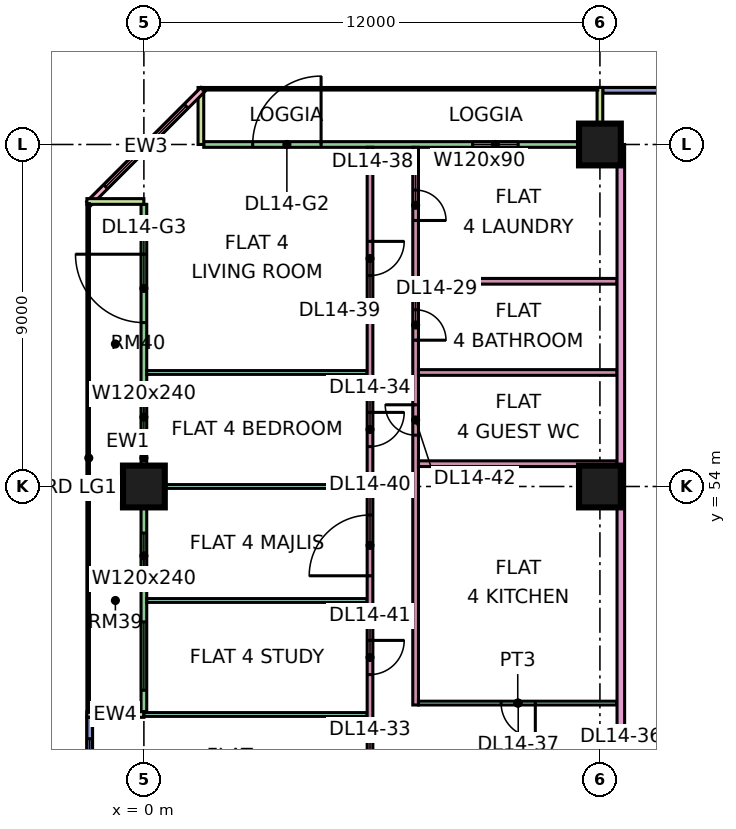
"""IFC4 building model, lengths in metres.
Left out: names, types, materials, properties, quantities, classifications, styles, units other than length and angle.
Written with IfcOpenShell. Run it as: python <this file> out.ifc"""

import sys

from ifc_helpers import new_model, si_unit, direction, frame, frame_2d, origin, origin_2d, place, context, subcontext, project, spatial, rectangle, extrude, element, fill, save


model = new_model("IFC4")
c1 = context("Model", 3, precision=1e-05, world=origin(), true_north=direction((0.0, 1.0)))
c2 = subcontext(c1, "Body", "Model", "MODEL_VIEW")
j1 = project(units=[si_unit("LENGTHUNIT", "METRE"), si_unit("PLANEANGLEUNIT", "RADIAN")], contexts=[c1])
p1 = place(None, origin())
s1 = spatial("IfcSite", under=j1, at=p1, CompositionType="ELEMENT")
p2 = place(p1, origin())
s2 = spatial("IfcBuilding", under=s1, at=p2, CompositionType="ELEMENT")
p3 = place(p2, frame((0.0, 0.0, 67.65)))
s3 = spatial("IfcBuildingStorey", under=s2, at=p3, CompositionType="ELEMENT", Elevation=67.65)
for number, where, z_axis, x_axis in (
    (1, (0.0, 54.0, 0.0), (0.0, 0.0, 1.0), (1.0, 0.0, 0.0)),
    (2, (12.0, 54.0, 0.0), (0.0, 0.0, 1.0), (1.0, 0.0, 0.0)),
    (3, (12.0, 63.0, 0.0), (0.0, 0.0, 1.0), (1.0, 0.0, 0.0)),
):
    element("IfcColumn", number, at=place(p3, frame(where, z_axis=z_axis, x_axis=x_axis)), inside=s3, PredefinedType="COLUMN", context=c2, shape_type="SweptSolid", body=[
        extrude(rectangle(XDim=1.1, YDim=1.1, at=origin_2d()), origin(), (0.0, 0.0, 1.0), 3.75),
    ])
p4 = place(p3, frame((22.5, 64.425, 0.0), z_axis=(0.0, 0.0, 1.0), x_axis=(-1.0, 0.0, 0.0)))
e4 = element("IfcWall", 4, at=p4, inside=s3, PredefinedType="SOLIDWALL", context=c2, shape_type="SweptSolid", body=[
    extrude(rectangle(XDim=10.425, YDim=0.15, at=frame_2d((5.212, 0.0))), origin(), (0.0, 0.0, 1.0), 3.35),
])
p5 = place(p4, frame((1.95, 0.0, 0.45)))
e5 = element("IfcOpeningElement", 5, at=p5, cuts=e4, PredefinedType="OPENING", context=c2, shape_type="SweptSolid", body=[
    extrude(rectangle(XDim=3.0, YDim=2.4, at=frame_2d((1.5, 1.2))), frame((0.0, 0.085, 0.0), z_axis=(0.0, -1.0, 0.0), x_axis=(1.0, 0.0, 0.0)), (0.0, 0.0, 1.0), 0.17),
])
p6 = place(p3, frame((11.925, 63.0, 0.0), z_axis=(0.0, 0.0, 1.0), x_axis=(-1.0, 0.0, 0.0)))
e6 = element("IfcWall", 6, at=p6, inside=s3, PredefinedType="SOLIDWALL", context=c2, shape_type="SweptSolid", body=[
    extrude(rectangle(XDim=10.35, YDim=0.15, at=frame_2d((5.175, 0.0))), origin(), (0.0, 0.0, 1.0), 3.35),
])
p7 = place(p6, frame((2.075, 0.0, 1.7)))
e7 = element("IfcOpeningElement", 7, at=p7, cuts=e6, PredefinedType="OPENING", context=c2, shape_type="SweptSolid", body=[
    extrude(rectangle(XDim=1.2, YDim=0.9, at=frame_2d((0.6, 0.45))), frame((0.0, 0.085, 0.0), z_axis=(0.0, -1.0, 0.0), x_axis=(1.0, 0.0, 0.0)), (0.0, 0.0, 1.0), 0.17),
])
p8 = place(p6, frame((7.262, 0.0, 0.0)))
e8 = element("IfcOpeningElement", 8, at=p8, cuts=e6, PredefinedType="OPENING", context=c2, shape_type="SweptSolid", body=[
    extrude(rectangle(XDim=1.8, YDim=2.4, at=frame_2d((0.9, 1.2))), frame((0.0, 0.085, 0.0), z_axis=(0.0, -1.0, 0.0), x_axis=(1.0, 0.0, 0.0)), (0.0, 0.0, 1.0), 0.17),
])
for number, where, z_axis, x_axis in (
    (9, (12.0, 64.5, 0.0), (0.0, 0.0, 1.0), (0.0, -1.0, 0.0)),
    (10, (1.5, 64.5, 0.0), (0.0, 0.0, 1.0), (0.0, -1.0, 0.0)),
):
    element("IfcWall", number, at=place(p3, frame(where, z_axis=z_axis, x_axis=x_axis)), inside=s3, PredefinedType="SOLIDWALL", context=c2, shape_type="SweptSolid", body=[
        extrude(rectangle(XDim=1.5, YDim=0.15, at=frame_2d((0.75, 0.0))), origin(), (0.0, 0.0, 1.0), 3.35),
    ])
p9 = place(p3, frame((1.553, 64.447, 0.0), z_axis=(0.0, 0.0, 1.0), x_axis=(-0.707106781187, -0.707106781187, 0.0)))
e11 = element("IfcWall", 11, at=p9, inside=s3, PredefinedType="SOLIDWALL", context=c2, shape_type="SweptSolid", body=[
    extrude(rectangle(XDim=4.243, YDim=0.15, at=frame_2d((2.121, 0.0))), origin(), (0.0, 0.0, 1.0), 3.35),
])
p10 = place(p9, frame((0.621, 0.0, 0.45)))
e12 = element("IfcOpeningElement", 12, at=p10, cuts=e11, PredefinedType="OPENING", context=c2, shape_type="SweptSolid", body=[
    extrude(rectangle(XDim=3.0, YDim=2.4, at=frame_2d((1.5, 1.2))), frame((0.0, 0.085, 0.0), z_axis=(0.0, -1.0, 0.0), x_axis=(1.0, 0.0, 0.0)), (0.0, 0.0, 1.0), 0.17),
])
p11 = place(p3, frame((0.0, 61.425, 0.0), z_axis=(0.0, 0.0, 1.0), x_axis=(0.0, -1.0, 0.0)))
e13 = element("IfcWall", 13, at=p11, inside=s3, PredefinedType="SOLIDWALL", context=c2, shape_type="SweptSolid", body=[
    extrude(rectangle(XDim=13.35, YDim=0.15, at=frame_2d((6.675, 0.0))), origin(), (0.0, 0.0, 1.0), 3.35),
])
p12 = place(p11, frame((1.312, 0.0, 0.0)))
e14 = element("IfcOpeningElement", 14, at=p12, cuts=e13, PredefinedType="OPENING", context=c2, shape_type="SweptSolid", body=[
    extrude(rectangle(XDim=1.8, YDim=2.4, at=frame_2d((0.9, 1.2))), frame((0.0, 0.085, 0.0), z_axis=(0.0, -1.0, 0.0), x_axis=(1.0, 0.0, 0.0)), (0.0, 0.0, 1.0), 0.17),
])
p13 = place(p11, frame((5.0, 0.0, 0.45)))
e15 = element("IfcOpeningElement", 15, at=p13, cuts=e13, PredefinedType="OPENING", context=c2, shape_type="SweptSolid", body=[
    extrude(rectangle(XDim=1.2, YDim=2.4, at=frame_2d((0.6, 1.2))), frame((0.0, 0.085, 0.0), z_axis=(0.0, -1.0, 0.0), x_axis=(1.0, 0.0, 0.0)), (0.0, 0.0, 1.0), 0.17),
])
p14 = place(p11, frame((8.65, 0.0, 0.45)))
e16 = element("IfcOpeningElement", 16, at=p14, cuts=e13, PredefinedType="OPENING", context=c2, shape_type="SweptSolid", body=[
    extrude(rectangle(XDim=1.2, YDim=2.4, at=frame_2d((0.6, 1.2))), frame((0.0, 0.085, 0.0), z_axis=(0.0, -1.0, 0.0), x_axis=(1.0, 0.0, 0.0)), (0.0, 0.0, 1.0), 0.17),
])
p15 = place(p11, frame((10.988, 0.0, 0.45)))
e17 = element("IfcOpeningElement", 17, at=p15, cuts=e13, PredefinedType="OPENING", context=c2, shape_type="SweptSolid", body=[
    extrude(rectangle(XDim=1.8, YDim=2.4, at=frame_2d((0.9, 1.2))), frame((0.0, 0.085, 0.0), z_axis=(0.0, -1.0, 0.0), x_axis=(1.0, 0.0, 0.0)), (0.0, 0.0, 1.0), 0.17),
])
for number, where, z_axis, x_axis in (
    (18, (-1.5, 61.5, 0.0), (0.0, 0.0, 1.0), (1.0, 0.0, 0.0)),
    (19, (-1.5, 48.0, 0.0), (0.0, 0.0, 1.0), (1.0, 0.0, 0.0)),
):
    element("IfcWall", number, at=place(p3, frame(where, z_axis=z_axis, x_axis=x_axis)), inside=s3, PredefinedType="SOLIDWALL", context=c2, shape_type="SweptSolid", body=[
        extrude(rectangle(XDim=1.5, YDim=0.15, at=frame_2d((0.75, 0.0))), origin(), (0.0, 0.0, 1.0), 3.35),
    ])
p16 = place(p3, frame((-1.425, 47.925, 0.0), z_axis=(0.0, 0.0, 1.0), x_axis=(0.0, -1.0, 0.0)))
e20 = element("IfcWall", 20, at=p16, inside=s3, PredefinedType="SOLIDWALL", context=c2, shape_type="SweptSolid", body=[
    extrude(rectangle(XDim=11.85, YDim=0.15, at=frame_2d((5.925, 0.0))), origin(), (0.0, 0.0, 1.0), 3.35),
])
p17 = place(p16, frame((0.562, 0.0, 0.45)))
e21 = element("IfcOpeningElement", 21, at=p17, cuts=e20, PredefinedType="OPENING", context=c2, shape_type="SweptSolid", body=[
    extrude(rectangle(XDim=1.8, YDim=2.4, at=frame_2d((0.9, 1.2))), frame((0.0, 0.085, 0.0), z_axis=(0.0, -1.0, 0.0), x_axis=(1.0, 0.0, 0.0)), (0.0, 0.0, 1.0), 0.17),
])
p18 = place(p16, frame((3.525, 0.0, 0.45)))
e22 = element("IfcOpeningElement", 22, at=p18, cuts=e20, PredefinedType="OPENING", context=c2, shape_type="SweptSolid", body=[
    extrude(rectangle(XDim=1.8, YDim=2.4, at=frame_2d((0.9, 1.2))), frame((0.0, 0.085, 0.0), z_axis=(0.0, -1.0, 0.0), x_axis=(1.0, 0.0, 0.0)), (0.0, 0.0, 1.0), 0.17),
])
p19 = place(p16, frame((6.525, 0.0, 0.45)))
e23 = element("IfcOpeningElement", 23, at=p19, cuts=e20, PredefinedType="OPENING", context=c2, shape_type="SweptSolid", body=[
    extrude(rectangle(XDim=1.8, YDim=2.4, at=frame_2d((0.9, 1.2))), frame((0.0, 0.085, 0.0), z_axis=(0.0, -1.0, 0.0), x_axis=(1.0, 0.0, 0.0)), (0.0, 0.0, 1.0), 0.17),
])
p20 = place(p16, frame((9.488, 0.0, 0.45)))
e24 = element("IfcOpeningElement", 24, at=p20, cuts=e20, PredefinedType="OPENING", context=c2, shape_type="SweptSolid", body=[
    extrude(rectangle(XDim=1.8, YDim=2.4, at=frame_2d((0.9, 1.2))), frame((0.0, 0.085, 0.0), z_axis=(0.0, -1.0, 0.0), x_axis=(1.0, 0.0, 0.0)), (0.0, 0.0, 1.0), 0.17),
])
p21 = place(p3, frame((0.0, 48.0, 0.0), z_axis=(0.0, 0.0, 1.0), x_axis=(1.0, 0.0, 0.0)))
e25 = element("IfcWall", 25, at=p21, inside=s3, PredefinedType="PARTITIONING", context=c2, shape_type="SweptSolid", body=[
    extrude(rectangle(XDim=5.875, YDim=0.1, at=frame_2d((2.938, 0.0))), origin(), (0.0, 0.0, 1.0), 3.35),
])
for number, where, z_axis, x_axis in (
    (26, (0.074, 51.0, 0.0), (0.0, 0.0, 1.0), (1.0, 0.0, 0.0)),
    (27, (0.074, 54.0, 0.0), (0.0, 0.0, 1.0), (1.0, 0.0, 0.0)),
    (28, (0.074, 57.0, 0.0), (0.0, 0.0, 1.0), (1.0, 0.0, 0.0)),
):
    element("IfcWall", number, at=place(p3, frame(where, z_axis=z_axis, x_axis=x_axis)), inside=s3, PredefinedType="PARTITIONING", context=c2, shape_type="SweptSolid", body=[
        extrude(rectangle(XDim=5.801, YDim=0.1, at=frame_2d((2.9, 0.0))), origin(), (0.0, 0.0, 1.0), 3.35),
    ])
p22 = place(p3, frame((5.95, 36.1, 0.0), z_axis=(0.0, 0.0, 1.0), x_axis=(0.0, 1.0, 0.0)))
e29 = element("IfcWall", 29, at=p22, inside=s3, PredefinedType="PARTITIONING", context=c2, shape_type="SweptSolid", body=[
    extrude(rectangle(XDim=26.826, YDim=0.15, at=frame_2d((13.413, 0.0))), origin(), (0.0, 0.0, 1.0), 3.35),
])
p23 = place(p22, frame((0.95, 0.0, 0.0)))
e30 = element("IfcOpeningElement", 30, at=p23, cuts=e29, PredefinedType="OPENING", context=c2, shape_type="SweptSolid", body=[
    extrude(rectangle(XDim=0.9, YDim=2.1, at=frame_2d((0.45, 1.05))), frame((0.0, 0.085, 0.0), z_axis=(0.0, -1.0, 0.0), x_axis=(1.0, 0.0, 0.0)), (0.0, 0.0, 1.0), 0.17),
])
p24 = place(p22, frame((3.95, 0.0, 0.0)))
e31 = element("IfcOpeningElement", 31, at=p24, cuts=e29, PredefinedType="OPENING", context=c2, shape_type="SweptSolid", body=[
    extrude(rectangle(XDim=0.9, YDim=2.1, at=frame_2d((0.45, 1.05))), frame((0.0, 0.085, 0.0), z_axis=(0.0, -1.0, 0.0), x_axis=(1.0, 0.0, 0.0)), (0.0, 0.0, 1.0), 0.17),
])
p25 = place(p22, frame((6.95, 0.0, 0.0)))
e32 = element("IfcOpeningElement", 32, at=p25, cuts=e29, PredefinedType="OPENING", context=c2, shape_type="SweptSolid", body=[
    extrude(rectangle(XDim=0.9, YDim=2.1, at=frame_2d((0.45, 1.05))), frame((0.0, 0.085, 0.0), z_axis=(0.0, -1.0, 0.0), x_axis=(1.0, 0.0, 0.0)), (0.0, 0.0, 1.0), 0.17),
])
p26 = place(p22, frame((9.95, 0.0, 0.0)))
e33 = element("IfcOpeningElement", 33, at=p26, cuts=e29, PredefinedType="OPENING", context=c2, shape_type="SweptSolid", body=[
    extrude(rectangle(XDim=0.9, YDim=2.1, at=frame_2d((0.45, 1.05))), frame((0.0, 0.085, 0.0), z_axis=(0.0, -1.0, 0.0), x_axis=(1.0, 0.0, 0.0)), (0.0, 0.0, 1.0), 0.17),
])
p27 = place(p22, frame((18.95, 0.0, 0.0)))
e34 = element("IfcOpeningElement", 34, at=p27, cuts=e29, PredefinedType="OPENING", context=c2, shape_type="SweptSolid", body=[
    extrude(rectangle(XDim=0.9, YDim=2.1, at=frame_2d((0.45, 1.05))), frame((0.0, 0.085, 0.0), z_axis=(0.0, -1.0, 0.0), x_axis=(1.0, 0.0, 0.0)), (0.0, 0.0, 1.0), 0.17),
])
p28 = place(p22, frame((23.45, 0.0, 0.0)))
e35 = element("IfcOpeningElement", 35, at=p28, cuts=e29, PredefinedType="OPENING", context=c2, shape_type="SweptSolid", body=[
    extrude(rectangle(XDim=0.9, YDim=2.1, at=frame_2d((0.45, 1.05))), frame((0.0, 0.085, 0.0), z_axis=(0.0, -1.0, 0.0), x_axis=(1.0, 0.0, 0.0)), (0.0, 0.0, 1.0), 0.17),
])
p29 = place(p22, frame((15.55, 0.0, 0.0)))
e36 = element("IfcOpeningElement", 36, at=p29, cuts=e29, PredefinedType="OPENING", context=c2, shape_type="SweptSolid", body=[
    extrude(rectangle(XDim=1.6, YDim=2.1, at=frame_2d((0.8, 1.05))), frame((0.0, 0.085, 0.0), z_axis=(0.0, -1.0, 0.0), x_axis=(1.0, 0.0, 0.0)), (0.0, 0.0, 1.0), 0.17),
])
p30 = place(p22, frame((12.95, 0.0, 0.0)))
e37 = element("IfcOpeningElement", 37, at=p30, cuts=e29, PredefinedType="OPENING", context=c2, shape_type="SweptSolid", body=[
    extrude(rectangle(XDim=0.9, YDim=2.1, at=frame_2d((0.45, 1.05))), frame((0.0, 0.085, 0.0), z_axis=(0.0, -1.0, 0.0), x_axis=(1.0, 0.0, 0.0)), (0.0, 0.0, 1.0), 0.17),
])
p31 = place(p3, frame((7.15, 48.25, 0.0), z_axis=(0.0, 0.0, 1.0), x_axis=(0.0, 1.0, 0.0)))
e38 = element("IfcWall", 38, at=p31, inside=s3, PredefinedType="PARTITIONING", context=c2, shape_type="SweptSolid", body=[
    extrude(rectangle(XDim=14.676, YDim=0.15, at=frame_2d((7.338, 0.0))), origin(), (0.0, 0.0, 1.0), 3.35),
])
p32 = place(p31, frame((9.6, 0.0, 0.0)))
e39 = element("IfcOpeningElement", 39, at=p32, cuts=e38, PredefinedType="OPENING", context=c2, shape_type="SweptSolid", body=[
    extrude(rectangle(XDim=0.8, YDim=2.1, at=frame_2d((0.4, 1.05))), frame((0.0, 0.085, 0.0), z_axis=(0.0, -1.0, 0.0), x_axis=(1.0, 0.0, 0.0)), (0.0, 0.0, 1.0), 0.17),
])
p33 = place(p31, frame((12.75, 0.0, 0.0)))
e40 = element("IfcOpeningElement", 40, at=p33, cuts=e38, PredefinedType="OPENING", context=c2, shape_type="SweptSolid", body=[
    extrude(rectangle(XDim=0.8, YDim=2.1, at=frame_2d((0.4, 1.05))), frame((0.0, 0.085, 0.0), z_axis=(0.0, -1.0, 0.0), x_axis=(1.0, 0.0, 0.0)), (0.0, 0.0, 1.0), 0.17),
])
p34 = place(p31, frame((7.1, 0.0, 0.0)))
e41 = element("IfcOpeningElement", 41, at=p34, cuts=e38, PredefinedType="OPENING", context=c2, shape_type="SweptSolid", body=[
    extrude(rectangle(XDim=0.8, YDim=2.1, at=frame_2d((0.4, 1.05))), frame((0.0, 0.085, 0.0), z_axis=(0.0, -1.0, 0.0), x_axis=(1.0, 0.0, 0.0)), (0.0, 0.0, 1.0), 0.17),
])
p35 = place(p3, frame((7.225, 48.3, 0.0), z_axis=(0.0, 0.0, 1.0), x_axis=(1.0, 0.0, 0.0)))
e42 = element("IfcWall", 42, at=p35, inside=s3, PredefinedType="PARTITIONING", context=c2, shape_type="SweptSolid", body=[
    extrude(rectangle(XDim=5.225, YDim=0.1, at=frame_2d((2.612, 0.0))), origin(), (0.0, 0.0, 1.0), 3.35),
])
p36 = place(p35, frame((2.175, 0.0, 0.0)))
e43 = element("IfcOpeningElement", 43, at=p36, cuts=e42, PredefinedType="OPENING", context=c2, shape_type="SweptSolid", body=[
    extrude(rectangle(XDim=0.9, YDim=2.1, at=frame_2d((0.45, 1.05))), frame((0.0, 0.06, 0.0), z_axis=(0.0, -1.0, 0.0), x_axis=(1.0, 0.0, 0.0)), (0.0, 0.0, 1.0), 0.12),
])
for number, where, z_axis, x_axis in (
    (44, (7.225, 54.6, 0.0), (0.0, 0.0, 1.0), (1.0, 0.0, 0.0)),
    (45, (7.225, 57.0, 0.0), (0.0, 0.0, 1.0), (1.0, 0.0, 0.0)),
    (46, (7.225, 59.4, 0.0), (0.0, 0.0, 1.0), (1.0, 0.0, 0.0)),
):
    element("IfcWall", number, at=place(p3, frame(where, z_axis=z_axis, x_axis=x_axis)), inside=s3, PredefinedType="PARTITIONING", context=c2, shape_type="SweptSolid", body=[
        extrude(rectangle(XDim=5.225, YDim=0.15, at=frame_2d((2.612, 0.0))), origin(), (0.0, 0.0, 1.0), 3.35),
    ])
p37 = place(p3, frame((12.55, 20.0, 0.0), z_axis=(0.0, 0.0, 1.0), x_axis=(0.0, 1.0, 0.0)))
e47 = element("IfcWall", 47, at=p37, inside=s3, PredefinedType="PARTITIONING", context=c2, shape_type="SweptSolid", body=[
    extrude(rectangle(XDim=43.0, YDim=0.2, at=frame_2d((21.5, 0.0))), origin(), (0.0, 0.0, 1.0), 3.35),
])
p38 = place(p37, frame((25.8, 0.0, 0.0)))
e48 = element("IfcOpeningElement", 48, at=p38, cuts=e47, PredefinedType="OPENING", context=c2, shape_type="SweptSolid", body=[
    extrude(rectangle(XDim=1.0, YDim=2.1, at=frame_2d((0.5, 1.05))), frame((0.0, 0.11, 0.0), z_axis=(0.0, -1.0, 0.0), x_axis=(1.0, 0.0, 0.0)), (0.0, 0.0, 1.0), 0.22),
])
p39 = place(p37, frame((0.6, 0.0, 0.0)))
e49 = element("IfcOpeningElement", 49, at=p39, cuts=e47, PredefinedType="OPENING", context=c2, shape_type="SweptSolid", body=[
    extrude(rectangle(XDim=1.2, YDim=2.1, at=frame_2d((0.6, 1.05))), frame((0.0, 0.11, 0.0), z_axis=(0.0, -1.0, 0.0), x_axis=(1.0, 0.0, 0.0)), (0.0, 0.0, 1.0), 0.22),
])
p40 = place(p37, frame((14.25, 0.0, 0.0)))
e50 = element("IfcOpeningElement", 50, at=p40, cuts=e47, PredefinedType="OPENING", context=c2, shape_type="SweptSolid", body=[
    extrude(rectangle(XDim=1.0, YDim=2.1, at=frame_2d((0.5, 1.05))), frame((0.0, 0.11, 0.0), z_axis=(0.0, -1.0, 0.0), x_axis=(1.0, 0.0, 0.0)), (0.0, 0.0, 1.0), 0.22),
])
p41 = place(p7, origin())
e51 = element("IfcWindow", 51, at=p41, inside=s3, PartitioningType="SINGLE_PANEL", PredefinedType="WINDOW", context=c2, shape_type="SweptSolid", body=[
    extrude(rectangle(XDim=1.2, YDim=0.9, at=frame_2d((0.6, 0.45))), frame((0.0, 0.03, 0.0), z_axis=(0.0, -1.0, 0.0), x_axis=(1.0, 0.0, 0.0)), (0.0, 0.0, 1.0), 0.06),
])
fill(e7, e51)
p42 = place(p8, frame((1.8, 0.0, 0.0), z_axis=(0.0, 0.0, 1.0), x_axis=(-1.0, 0.0, 0.0)))
e52 = element("IfcDoor", 52, at=p42, inside=s3, OperationType="DOUBLE_DOOR_SINGLE_SWING", PredefinedType="DOOR", context=c2, shape_type="SweptSolid", body=[
    extrude(rectangle(XDim=1.8, YDim=2.4, at=frame_2d((0.9, 1.2))), frame((0.0, 0.025, 0.0), z_axis=(0.0, -1.0, 0.0), x_axis=(1.0, 0.0, 0.0)), (0.0, 0.0, 1.0), 0.05),
])
fill(e8, e52)
p43 = place(p10, origin())
e53 = element("IfcWindow", 53, at=p43, inside=s3, PartitioningType="SINGLE_PANEL", PredefinedType="WINDOW", context=c2, shape_type="SweptSolid", body=[
    extrude(rectangle(XDim=3.0, YDim=2.4, at=frame_2d((1.5, 1.2))), frame((0.0, 0.03, 0.0), z_axis=(0.0, -1.0, 0.0), x_axis=(1.0, 0.0, 0.0)), (0.0, 0.0, 1.0), 0.06),
])
fill(e12, e53)
p44 = place(p12, frame((1.8, 0.0, 0.0), z_axis=(0.0, 0.0, 1.0), x_axis=(-1.0, 0.0, 0.0)))
e54 = element("IfcDoor", 54, at=p44, inside=s3, OperationType="DOUBLE_DOOR_SINGLE_SWING", PredefinedType="DOOR", context=c2, shape_type="SweptSolid", body=[
    extrude(rectangle(XDim=1.8, YDim=2.4, at=frame_2d((0.9, 1.2))), frame((0.0, 0.025, 0.0), z_axis=(0.0, -1.0, 0.0), x_axis=(1.0, 0.0, 0.0)), (0.0, 0.0, 1.0), 0.05),
])
fill(e14, e54)
p45 = place(p13, origin())
e55 = element("IfcWindow", 55, at=p45, inside=s3, PartitioningType="SINGLE_PANEL", PredefinedType="WINDOW", context=c2, shape_type="SweptSolid", body=[
    extrude(rectangle(XDim=1.2, YDim=2.4, at=frame_2d((0.6, 1.2))), frame((0.0, 0.03, 0.0), z_axis=(0.0, -1.0, 0.0), x_axis=(1.0, 0.0, 0.0)), (0.0, 0.0, 1.0), 0.06),
])
fill(e15, e55)
p46 = place(p14, origin())
e56 = element("IfcWindow", 56, at=p46, inside=s3, PartitioningType="SINGLE_PANEL", PredefinedType="WINDOW", context=c2, shape_type="SweptSolid", body=[
    extrude(rectangle(XDim=1.2, YDim=2.4, at=frame_2d((0.6, 1.2))), frame((0.0, 0.03, 0.0), z_axis=(0.0, -1.0, 0.0), x_axis=(1.0, 0.0, 0.0)), (0.0, 0.0, 1.0), 0.06),
])
fill(e16, e56)
p47 = place(p15, origin())
e57 = element("IfcWindow", 57, at=p47, inside=s3, PartitioningType="SINGLE_PANEL", PredefinedType="WINDOW", context=c2, shape_type="SweptSolid", body=[
    extrude(rectangle(XDim=1.8, YDim=2.4, at=frame_2d((0.9, 1.2))), frame((0.0, 0.03, 0.0), z_axis=(0.0, -1.0, 0.0), x_axis=(1.0, 0.0, 0.0)), (0.0, 0.0, 1.0), 0.06),
])
fill(e17, e57)
p48 = place(p17, origin())
e58 = element("IfcWindow", 58, at=p48, inside=s3, PartitioningType="SINGLE_PANEL", PredefinedType="WINDOW", context=c2, shape_type="SweptSolid", body=[
    extrude(rectangle(XDim=1.8, YDim=2.4, at=frame_2d((0.9, 1.2))), frame((0.0, 0.03, 0.0), z_axis=(0.0, -1.0, 0.0), x_axis=(1.0, 0.0, 0.0)), (0.0, 0.0, 1.0), 0.06),
])
fill(e21, e58)
p49 = place(p32, frame((0.8, 0.0, 0.0), z_axis=(0.0, 0.0, 1.0), x_axis=(-1.0, 0.0, 0.0)))
e59 = element("IfcDoor", 59, at=p49, inside=s3, OperationType="SINGLE_SWING_LEFT", PredefinedType="DOOR", context=c2, shape_type="SweptSolid", body=[
    extrude(rectangle(XDim=0.8, YDim=2.1, at=frame_2d((0.4, 1.05))), frame((0.0, 0.025, 0.0), z_axis=(0.0, -1.0, 0.0), x_axis=(1.0, 0.0, 0.0)), (0.0, 0.0, 1.0), 0.05),
])
fill(e39, e59)
p50 = place(p27, origin())
e60 = element("IfcDoor", 60, at=p50, inside=s3, OperationType="SINGLE_SWING_RIGHT", PredefinedType="DOOR", context=c2, shape_type="SweptSolid", body=[
    extrude(rectangle(XDim=0.9, YDim=2.1, at=frame_2d((0.45, 1.05))), frame((0.0, 0.025, 0.0), z_axis=(0.0, -1.0, 0.0), x_axis=(1.0, 0.0, 0.0)), (0.0, 0.0, 1.0), 0.05),
])
fill(e34, e60)
p51 = place(p36, origin())
e61 = element("IfcDoor", 61, at=p51, inside=s3, OperationType="SINGLE_SWING_RIGHT", PredefinedType="DOOR", context=c2, shape_type="SweptSolid", body=[
    extrude(rectangle(XDim=0.9, YDim=2.1, at=frame_2d((0.45, 1.05))), frame((0.0, 0.025, 0.0), z_axis=(0.0, -1.0, 0.0), x_axis=(1.0, 0.0, 0.0)), (0.0, 0.0, 1.0), 0.05),
])
fill(e43, e61)
p52 = place(p33, frame((0.8, 0.0, 0.0), z_axis=(0.0, 0.0, 1.0), x_axis=(-1.0, 0.0, 0.0)))
e62 = element("IfcDoor", 62, at=p52, inside=s3, OperationType="SINGLE_SWING_LEFT", PredefinedType="DOOR", context=c2, shape_type="SweptSolid", body=[
    extrude(rectangle(XDim=0.8, YDim=2.1, at=frame_2d((0.4, 1.05))), frame((0.0, 0.025, 0.0), z_axis=(0.0, -1.0, 0.0), x_axis=(1.0, 0.0, 0.0)), (0.0, 0.0, 1.0), 0.05),
])
fill(e40, e62)
p53 = place(p28, origin())
e63 = element("IfcDoor", 63, at=p53, inside=s3, OperationType="SINGLE_SWING_RIGHT", PredefinedType="DOOR", context=c2, shape_type="SweptSolid", body=[
    extrude(rectangle(XDim=0.9, YDim=2.1, at=frame_2d((0.45, 1.05))), frame((0.0, 0.025, 0.0), z_axis=(0.0, -1.0, 0.0), x_axis=(1.0, 0.0, 0.0)), (0.0, 0.0, 1.0), 0.05),
])
fill(e35, e63)
p54 = place(p29, origin())
e64 = element("IfcDoor", 64, at=p54, inside=s3, OperationType="DOUBLE_DOOR_SINGLE_SWING", PredefinedType="DOOR", context=c2, shape_type="SweptSolid", body=[
    extrude(rectangle(XDim=1.6, YDim=2.1, at=frame_2d((0.8, 1.05))), frame((0.0, 0.025, 0.0), z_axis=(0.0, -1.0, 0.0), x_axis=(1.0, 0.0, 0.0)), (0.0, 0.0, 1.0), 0.05),
])
fill(e36, e64)
p55 = place(p30, origin())
e65 = element("IfcDoor", 65, at=p55, inside=s3, OperationType="SINGLE_SWING_RIGHT", PredefinedType="DOOR", context=c2, shape_type="SweptSolid", body=[
    extrude(rectangle(XDim=0.9, YDim=2.1, at=frame_2d((0.45, 1.05))), frame((0.0, 0.025, 0.0), z_axis=(0.0, -1.0, 0.0), x_axis=(1.0, 0.0, 0.0)), (0.0, 0.0, 1.0), 0.05),
])
fill(e37, e65)
p56 = place(p34, frame((0.8, 0.0, 0.0), z_axis=(0.0, 0.0, 1.0), x_axis=(-1.0, 0.0, 0.0)))
e66 = element("IfcDoor", 66, at=p56, inside=s3, OperationType="SINGLE_SWING_RIGHT", PredefinedType="DOOR", context=c2, shape_type="SweptSolid", body=[
    extrude(rectangle(XDim=0.8, YDim=2.1, at=frame_2d((0.4, 1.05))), frame((0.0, 0.025, 0.0), z_axis=(0.0, -1.0, 0.0), x_axis=(1.0, 0.0, 0.0)), (0.0, 0.0, 1.0), 0.05),
])
fill(e41, e66)
save(model, sys.argv[1])
